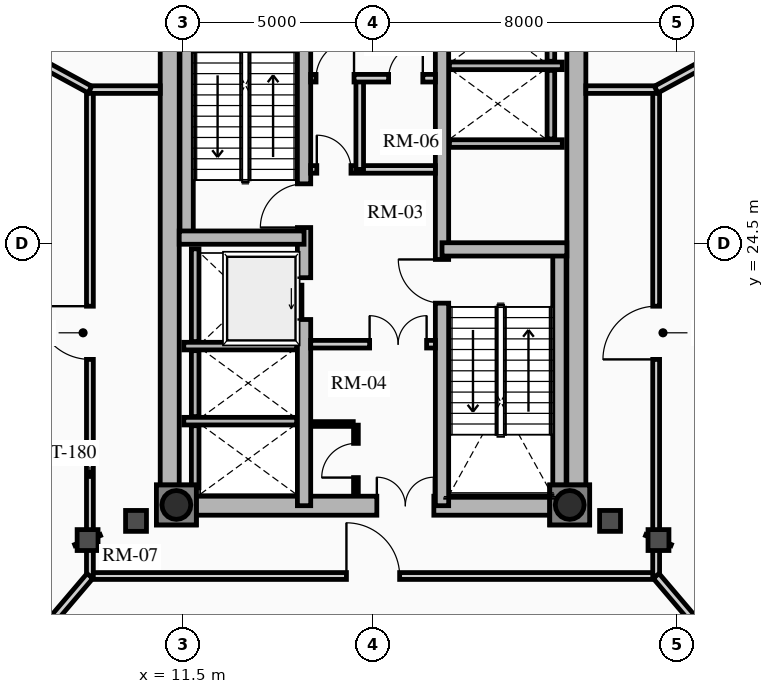
"""IFC4 building model, lengths in metres.
Left out: names, types, materials, properties, quantities, classifications, styles, units other than length and angle.
Written with IfcOpenShell. Run it as: python <this file> out.ifc"""

import sys

from ifc_helpers import new_model, si_unit, direction, frame, frame_2d, origin, origin_2d, place, context, subcontext, project, spatial, rectangle, hollow_circle, extrude, source, transform, mapped, element, fill, save


model = new_model("IFC4")
c1 = context("Model", 3, precision=1e-05, world=origin(), true_north=direction((0.0, 1.0)))
c2 = subcontext(c1, "Body", "Model", "MODEL_VIEW")
j1 = project(units=[si_unit("LENGTHUNIT", "METRE"), si_unit("PLANEANGLEUNIT", "RADIAN")], contexts=[c1])
p1 = place(None, origin())
s1 = spatial("IfcSite", under=j1, at=p1, CompositionType="ELEMENT")
p2 = place(p1, origin())
s2 = spatial("IfcBuilding", under=s1, at=p2, CompositionType="ELEMENT")
p3 = place(p2, frame((0.0, 0.0, 65.65)))
s3 = spatial("IfcBuildingStorey", under=s2, at=p3, CompositionType="ELEMENT", Elevation=65.65)
for number, where, z_axis, x_axis in (
    (1, (11.15, 17.35, 0.0), (0.0, 0.0, 1.0), (0.0, 1.0, 0.0)),
    (2, (21.85, 17.35, 0.0), (0.0, 0.0, 1.0), (0.0, 1.0, 0.0)),
):
    element("IfcWall", number, at=place(p3, frame(where, z_axis=z_axis, x_axis=x_axis)), inside=s3, PredefinedType="SHEAR", context=c2, shape_type="SweptSolid", body=[
        extrude(rectangle(XDim=14.3, YDim=0.5, at=frame_2d((7.15, 0.0))), origin(), (0.0, 0.0, 1.0), 4.5),
    ])
p4 = place(p3, frame((11.15, 17.6, 0.0), z_axis=(0.0, 0.0, 1.0), x_axis=(1.0, 0.0, 0.0)))
e3 = element("IfcWall", 3, at=p4, inside=s3, PredefinedType="SHEAR", context=c2, shape_type="SweptSolid", body=[
    extrude(rectangle(XDim=10.7, YDim=0.5, at=frame_2d((5.35, 0.0))), origin(), (0.0, 0.0, 1.0), 4.5),
])
m1 = source(origin(), c2, "Body", "SweptSolid", [
    extrude(rectangle(XDim=1.5, YDim=2.02, at=frame_2d((0.75, 1.01))), frame((0.0, 0.26, 0.0), z_axis=(0.0, -1.0, 0.0), x_axis=(1.0, 0.0, 0.0)), (0.0, 0.0, 1.0), 0.52),
])
p5 = place(p4, frame((5.45, 0.0, 0.0)))
e4 = element("IfcOpeningElement", 4, at=p5, cuts=e3, PredefinedType="OPENING", context=c2, shape_type="MappedRepresentation", body=[
    mapped(m1, transform((0.0, 0.0, 0.0), x_axis=(1.0, 0.0, 0.0), y_axis=(0.0, 1.0, 0.0), z_axis=(0.0, 0.0, 1.0), scale=1.0)),
])
p6 = place(p3, frame((14.685, 17.6, 0.0), z_axis=(0.0, 0.0, 1.0), x_axis=(0.0, 1.0, 0.0)))
e5 = element("IfcWall", 5, at=p6, inside=s3, PredefinedType="SHEAR", context=c2, shape_type="SweptSolid", body=[
    extrude(rectangle(XDim=13.8, YDim=0.35, at=frame_2d((6.9, 0.0))), origin(), (0.0, 0.0, 1.0), 4.5),
])
m2 = source(origin(), c2, "Body", "SweptSolid", [
    extrude(rectangle(XDim=1.1, YDim=2.015, at=frame_2d((0.55, 1.007))), frame((0.0, 0.185, 0.0), z_axis=(0.0, -1.0, 0.0), x_axis=(1.0, 0.0, 0.0)), (0.0, 0.0, 1.0), 0.37),
])
p7 = place(p6, frame((4.9, 0.0, 0.0)))
e6 = element("IfcOpeningElement", 6, at=p7, cuts=e5, PredefinedType="OPENING", context=c2, shape_type="MappedRepresentation", body=[
    mapped(m2, transform((0.0, 0.0, 0.0), x_axis=(1.0, 0.0, 0.0), y_axis=(0.0, 1.0, 0.0), z_axis=(0.0, 0.0, 1.0), scale=1.0)),
])
m3 = source(origin(), c2, "Body", "SweptSolid", [
    extrude(rectangle(XDim=1.15, YDim=2.02, at=frame_2d((0.575, 1.01))), frame((0.0, 0.185, 0.0), z_axis=(0.0, -1.0, 0.0), x_axis=(1.0, 0.0, 0.0)), (0.0, 0.0, 1.0), 0.37),
])
p8 = place(p6, frame((7.32, 0.0, 0.0)))
e7 = element("IfcOpeningElement", 7, at=p8, cuts=e5, PredefinedType="OPENING", context=c2, shape_type="MappedRepresentation", body=[
    mapped(m3, transform((0.0, 0.0, 0.0), x_axis=(1.0, 0.0, 0.0), y_axis=(0.0, 1.0, 0.0), z_axis=(0.0, 0.0, 1.0), scale=1.0)),
])
p9 = place(p3, frame((18.315, 17.6, 0.0), z_axis=(0.0, 0.0, 1.0), x_axis=(0.0, 1.0, 0.0)))
e8 = element("IfcWall", 8, at=p9, inside=s3, PredefinedType="SHEAR", context=c2, shape_type="SweptSolid", body=[
    extrude(rectangle(XDim=13.8, YDim=0.35, at=frame_2d((6.9, 0.0))), origin(), (0.0, 0.0, 1.0), 4.5),
])
p10 = place(p9, frame((5.33, 0.0, 0.0)))
e9 = element("IfcOpeningElement", 9, at=p10, cuts=e8, PredefinedType="OPENING", context=c2, shape_type="MappedRepresentation", body=[
    mapped(m3, transform((0.0, 0.0, 0.0), x_axis=(1.0, 0.0, 0.0), y_axis=(0.0, 1.0, 0.0), z_axis=(0.0, 0.0, 1.0), scale=1.0)),
])
p11 = place(p3, frame((11.595, 24.655, 0.0), z_axis=(0.0, 0.0, 1.0), x_axis=(0.0, 1.0, 0.0)))
e10 = element("IfcWall", 10, at=p11, inside=s3, PredefinedType="SHEAR", context=c2, shape_type="SweptSolid", body=[
    extrude(rectangle(XDim=6.745, YDim=0.35, at=frame_2d((3.373, 0.0))), origin(), (0.0, 0.0, 1.0), 4.5),
])
p12 = place(p3, frame((11.4, 24.655, 0.0), z_axis=(0.0, 0.0, 1.0), x_axis=(1.0, 0.0, 0.0)))
e11 = element("IfcWall", 11, at=p12, inside=s3, PredefinedType="SHEAR", context=c2, shape_type="SweptSolid", body=[
    extrude(rectangle(XDim=3.285, YDim=0.35, at=frame_2d((1.643, 0.0))), origin(), (0.0, 0.0, 1.0), 4.5),
])
p13 = place(p3, frame((21.405, 17.6, 0.0), z_axis=(0.0, 0.0, 1.0), x_axis=(0.0, 1.0, 0.0)))
e12 = element("IfcWall", 12, at=p13, inside=s3, PredefinedType="SHEAR", context=c2, shape_type="SweptSolid", body=[
    extrude(rectangle(XDim=6.745, YDim=0.35, at=frame_2d((3.373, 0.0))), origin(), (0.0, 0.0, 1.0), 4.5),
])
p14 = place(p3, frame((18.315, 24.345, 0.0), z_axis=(0.0, 0.0, 1.0), x_axis=(1.0, 0.0, 0.0)))
e13 = element("IfcWall", 13, at=p14, inside=s3, PredefinedType="SHEAR", context=c2, shape_type="SweptSolid", body=[
    extrude(rectangle(XDim=3.285, YDim=0.35, at=frame_2d((1.643, 0.0))), origin(), (0.0, 0.0, 1.0), 4.5),
])
for number, where, z_axis, x_axis in (
    (14, (11.325, 17.62, 0.0), (0.0, 0.0, 1.0), (1.0, 0.0, 0.0)),
    (15, (21.675, 17.62, 0.0), (0.0, 0.0, 1.0), (1.0, 0.0, 0.0)),
):
    element("IfcColumn", number, at=place(p3, frame(where, z_axis=z_axis, x_axis=x_axis)), inside=s3, PredefinedType="COLUMN", context=c2, shape_type="SweptSolid", body=[
        extrude(hollow_circle(Radius=0.38, WallThickness=0.032, at=origin_2d()), origin(), (0.0, 0.0, 1.0), 4.5),
    ])
p15 = place(p3, frame((11.52, 21.8, 0.0), z_axis=(0.0, 0.0, 1.0), x_axis=(1.0, 0.0, 0.0)))
e16 = element("IfcWall", 16, at=p15, inside=s3, PredefinedType="SHEAR", context=c2, shape_type="SweptSolid", body=[
    extrude(rectangle(XDim=2.97, YDim=0.2, at=frame_2d((1.485, 0.0))), origin(), (0.0, 0.0, 1.0), 4.5),
])
p16 = place(p3, frame((11.82, 21.92, 0.0), z_axis=(0.0, 0.0, 1.0), x_axis=(0.0, 1.0, 0.0)))
e17 = element("IfcWall", 17, at=p16, inside=s3, PredefinedType="SHEAR", context=c2, shape_type="SweptSolid", body=[
    extrude(rectangle(XDim=2.44, YDim=0.2, at=frame_2d((1.22, 0.0))), origin(), (0.0, 0.0, 1.0), 4.5),
])
p17 = place(p3, frame((11.52, 19.825, 0.0), z_axis=(0.0, 0.0, 1.0), x_axis=(1.0, 0.0, 0.0)))
e18 = element("IfcWall", 18, at=p17, inside=s3, PredefinedType="SHEAR", context=c2, shape_type="SweptSolid", body=[
    extrude(rectangle(XDim=2.97, YDim=0.2, at=frame_2d((1.485, 0.0))), origin(), (0.0, 0.0, 1.0), 4.5),
])
p18 = place(p3, frame((11.82, 19.945, 0.0), z_axis=(0.0, 0.0, 1.0), x_axis=(0.0, 1.0, 0.0)))
e19 = element("IfcWall", 19, at=p18, inside=s3, PredefinedType="SHEAR", context=c2, shape_type="SweptSolid", body=[
    extrude(rectangle(XDim=1.735, YDim=0.2, at=frame_2d((0.867, 0.0))), origin(), (0.0, 0.0, 1.0), 4.5),
])
p19 = place(p3, frame((11.82, 18.07, 0.0), z_axis=(0.0, 0.0, 1.0), x_axis=(0.0, 1.0, 0.0)))
e20 = element("IfcWall", 20, at=p19, inside=s3, PredefinedType="SHEAR", context=c2, shape_type="SweptSolid", body=[
    extrude(rectangle(XDim=1.635, YDim=0.2, at=frame_2d((0.817, 0.0))), origin(), (0.0, 0.0, 1.0), 4.5),
])
for number, where, z_axis, x_axis in (
    (21, (18.51, 27.13, 0.0), (0.0, 0.0, 1.0), (1.0, 0.0, 0.0)),
    (22, (18.51, 29.175, 0.0), (0.0, 0.0, 1.0), (1.0, 0.0, 0.0)),
):
    element("IfcWall", number, at=place(p3, frame(where, z_axis=z_axis, x_axis=x_axis)), inside=s3, PredefinedType="SHEAR", context=c2, shape_type="SweptSolid", body=[
        extrude(rectangle(XDim=2.97, YDim=0.2, at=frame_2d((1.485, 0.0))), origin(), (0.0, 0.0, 1.0), 4.5),
    ])
p20 = place(p3, frame((21.18, 27.25, 0.0), z_axis=(0.0, 0.0, 1.0), x_axis=(0.0, 1.0, 0.0)))
e23 = element("IfcWall", 23, at=p20, inside=s3, PredefinedType="SHEAR", context=c2, shape_type="SweptSolid", body=[
    extrude(rectangle(XDim=1.805, YDim=0.2, at=frame_2d((0.902, 0.0))), origin(), (0.0, 0.0, 1.0), 4.5),
])
p21 = place(p3, frame((21.18, 29.295, 0.0), z_axis=(0.0, 0.0, 1.0), x_axis=(0.0, 1.0, 0.0)))
e24 = element("IfcWall", 24, at=p21, inside=s3, PredefinedType="SHEAR", context=c2, shape_type="SweptSolid", body=[
    extrude(rectangle(XDim=1.635, YDim=0.2, at=frame_2d((0.817, 0.0))), origin(), (0.0, 0.0, 1.0), 4.5),
])
p22 = place(p3, frame((14.86, 21.85, 0.0), z_axis=(0.0, 0.0, 1.0), x_axis=(1.0, 0.0, 0.0)))
e25 = element("IfcWall", 25, at=p22, inside=s3, PredefinedType="PARTITIONING", context=c2, shape_type="SweptSolid", body=[
    extrude(rectangle(XDim=3.28, YDim=0.2, at=frame_2d((1.64, 0.0))), origin(), (0.0, 0.0, 1.0), 4.245),
])
m4 = source(origin(), c2, "Body", "SweptSolid", [
    extrude(rectangle(XDim=1.5, YDim=2.02, at=frame_2d((0.75, 1.01))), frame((0.0, 0.11, 0.0), z_axis=(0.0, -1.0, 0.0), x_axis=(1.0, 0.0, 0.0)), (0.0, 0.0, 1.0), 0.22),
])
p23 = place(p22, frame((1.55, 0.0, 0.0)))
e26 = element("IfcOpeningElement", 26, at=p23, cuts=e25, PredefinedType="OPENING", context=c2, shape_type="MappedRepresentation", body=[
    mapped(m4, transform((0.0, 0.0, 0.0), x_axis=(1.0, 0.0, 0.0), y_axis=(0.0, 1.0, 0.0), z_axis=(0.0, 0.0, 1.0), scale=1.0)),
])
p24 = place(p3, frame((14.86, 26.45, 0.0), z_axis=(0.0, 0.0, 1.0), x_axis=(1.0, 0.0, 0.0)))
e27 = element("IfcWall", 27, at=p24, inside=s3, PredefinedType="PARTITIONING", context=c2, shape_type="SweptSolid", body=[
    extrude(rectangle(XDim=3.28, YDim=0.2, at=frame_2d((1.64, 0.0))), origin(), (0.0, 0.0, 1.0), 4.245),
])
m5 = source(origin(), c2, "Body", "SweptSolid", [
    extrude(rectangle(XDim=0.9, YDim=2.005, at=frame_2d((0.45, 1.002))), frame((0.0, 0.11, 0.0), z_axis=(0.0, -1.0, 0.0), x_axis=(1.0, 0.0, 0.0)), (0.0, 0.0, 1.0), 0.22),
])
p25 = place(p24, frame((0.16, 0.0, 0.0)))
e28 = element("IfcOpeningElement", 28, at=p25, cuts=e27, PredefinedType="OPENING", context=c2, shape_type="MappedRepresentation", body=[
    mapped(m5, transform((0.0, 0.0, 0.0), x_axis=(1.0, 0.0, 0.0), y_axis=(0.0, 1.0, 0.0), z_axis=(0.0, 0.0, 1.0), scale=1.0)),
])
p26 = place(p3, frame((16.15, 26.45, 0.0), z_axis=(0.0, 0.0, 1.0), x_axis=(0.0, 1.0, 0.0)))
e29 = element("IfcWall", 29, at=p26, inside=s3, PredefinedType="PARTITIONING", context=c2, shape_type="SweptSolid", body=[
    extrude(rectangle(XDim=2.4, YDim=0.2, at=frame_2d((1.2, 0.0))), origin(), (0.0, 0.0, 1.0), 4.245),
])
p27 = place(p3, frame((14.86, 28.85, 0.0), z_axis=(0.0, 0.0, 1.0), x_axis=(1.0, 0.0, 0.0)))
e30 = element("IfcWall", 30, at=p27, inside=s3, PredefinedType="PARTITIONING", context=c2, shape_type="SweptSolid", body=[
    extrude(rectangle(XDim=3.28, YDim=0.2, at=frame_2d((1.64, 0.0))), origin(), (0.0, 0.0, 1.0), 4.245),
])
m6 = source(origin(), c2, "Body", "SweptSolid", [
    extrude(rectangle(XDim=1.0, YDim=2.015, at=frame_2d((0.5, 1.007))), frame((0.0, 0.11, 0.0), z_axis=(0.0, -1.0, 0.0), x_axis=(1.0, 0.0, 0.0)), (0.0, 0.0, 1.0), 0.22),
])
p28 = place(p27, frame((0.14, 0.0, 0.0)))
e31 = element("IfcOpeningElement", 31, at=p28, cuts=e30, PredefinedType="OPENING", context=c2, shape_type="MappedRepresentation", body=[
    mapped(m6, transform((0.0, 0.0, 0.0), x_axis=(1.0, 0.0, 0.0), y_axis=(0.0, 1.0, 0.0), z_axis=(0.0, 0.0, 1.0), scale=1.0)),
])
p29 = place(p27, frame((2.05, 0.0, 0.0)))
e32 = element("IfcOpeningElement", 32, at=p29, cuts=e30, PredefinedType="OPENING", context=c2, shape_type="MappedRepresentation", body=[
    mapped(m5, transform((0.0, 0.0, 0.0), x_axis=(1.0, 0.0, 0.0), y_axis=(0.0, 1.0, 0.0), z_axis=(0.0, 0.0, 1.0), scale=1.0)),
])
p30 = place(p3, frame((16.05, 17.92, 0.0), z_axis=(0.0, 0.0, 1.0), x_axis=(0.0, 1.0, 0.0)))
e33 = element("IfcWall", 33, at=p30, inside=s3, PredefinedType="PARTITIONING", context=c2, shape_type="SweptSolid", body=[
    extrude(rectangle(XDim=1.8, YDim=0.125, at=frame_2d((0.9, 0.0))), origin(), (0.0, 0.0, 1.0), 4.245),
])
m7 = source(origin(), c2, "Body", "SweptSolid", [
    extrude(rectangle(XDim=0.9, YDim=2.005, at=frame_2d((0.45, 1.002))), frame((0.0, 0.073, 0.0), z_axis=(0.0, -1.0, 0.0), x_axis=(1.0, 0.0, 0.0)), (0.0, 0.0, 1.0), 0.145),
])
p31 = place(p30, frame((0.42, 0.0, 0.0)))
e34 = element("IfcOpeningElement", 34, at=p31, cuts=e33, PredefinedType="OPENING", context=c2, shape_type="MappedRepresentation", body=[
    mapped(m7, transform((0.0, 0.0, 0.0), x_axis=(1.0, 0.0, 0.0), y_axis=(0.0, 1.0, 0.0), z_axis=(0.0, 0.0, 1.0), scale=1.0)),
])
p32 = place(p3, frame((14.88, 19.75, 0.0), z_axis=(0.0, 0.0, 1.0), x_axis=(1.0, 0.0, 0.0)))
e35 = element("IfcWall", 35, at=p32, inside=s3, PredefinedType="PARTITIONING", context=c2, shape_type="SweptSolid", body=[
    extrude(rectangle(XDim=1.1, YDim=0.125, at=frame_2d((0.55, 0.0))), origin(), (0.0, 0.0, 1.0), 4.245),
])
p33 = place(p3, frame((9.05, 15.75, 0.0), z_axis=(0.0, 0.0, 1.0), x_axis=(1.0, 0.0, 0.0)))
e36 = element("IfcWall", 36, at=p33, inside=s3, PredefinedType="PARTITIONING", context=c2, shape_type="SweptSolid", body=[
    extrude(rectangle(XDim=14.9, YDim=0.18, at=frame_2d((7.45, 0.0))), origin(), (0.0, 0.0, 1.0), 3.536),
])
m8 = source(origin(), c2, "Body", "SweptSolid", [
    extrude(rectangle(XDim=1.4, YDim=2.02, at=frame_2d((0.7, 1.01))), frame((0.0, 0.1, 0.0), z_axis=(0.0, -1.0, 0.0), x_axis=(1.0, 0.0, 0.0)), (0.0, 0.0, 1.0), 0.2),
])
p34 = place(p33, frame((6.75, 0.0, 0.0)))
e37 = element("IfcOpeningElement", 37, at=p34, cuts=e36, PredefinedType="OPENING", context=c2, shape_type="MappedRepresentation", body=[
    mapped(m8, transform((0.0, 0.0, 0.0), x_axis=(1.0, 0.0, 0.0), y_axis=(0.0, 1.0, 0.0), z_axis=(0.0, 0.0, 1.0), scale=1.0)),
])
p35 = place(p3, frame((9.05, 15.75, 0.0), z_axis=(0.0, 0.0, 1.0), x_axis=(0.0, 1.0, 0.0)))
e38 = element("IfcWall", 38, at=p35, inside=s3, PredefinedType="PARTITIONING", context=c2, shape_type="SweptSolid", body=[
    extrude(rectangle(XDim=12.8, YDim=0.18, at=frame_2d((6.4, 0.0))), origin(), (0.0, 0.0, 1.0), 3.536),
])
p36 = place(p35, frame((5.7, 0.0, 0.0)))
e39 = element("IfcOpeningElement", 39, at=p36, cuts=e38, PredefinedType="OPENING", context=c2, shape_type="MappedRepresentation", body=[
    mapped(m8, transform((0.0, 0.0, 0.0), x_axis=(1.0, 0.0, 0.0), y_axis=(0.0, 1.0, 0.0), z_axis=(0.0, 0.0, 1.0), scale=1.0)),
])
p37 = place(p3, frame((23.95, 15.75, 0.0), z_axis=(0.0, 0.0, 1.0), x_axis=(0.0, 1.0, 0.0)))
e40 = element("IfcWall", 40, at=p37, inside=s3, PredefinedType="PARTITIONING", context=c2, shape_type="SweptSolid", body=[
    extrude(rectangle(XDim=12.8, YDim=0.18, at=frame_2d((6.4, 0.0))), origin(), (0.0, 0.0, 1.0), 3.536),
])
p38 = place(p37, frame((5.7, 0.0, 0.0)))
e41 = element("IfcOpeningElement", 41, at=p38, cuts=e40, PredefinedType="OPENING", context=c2, shape_type="MappedRepresentation", body=[
    mapped(m8, transform((0.0, 0.0, 0.0), x_axis=(1.0, 0.0, 0.0), y_axis=(0.0, 1.0, 0.0), z_axis=(0.0, 0.0, 1.0), scale=1.0)),
])
for number, where, z_axis, x_axis in (
    (42, (9.05, 28.55, 0.0), (0.0, 0.0, 1.0), (1.0, 0.0, 0.0)),
    (43, (22.1, 28.55, 0.0), (0.0, 0.0, 1.0), (1.0, 0.0, 0.0)),
):
    element("IfcWall", number, at=place(p3, frame(where, z_axis=z_axis, x_axis=x_axis)), inside=s3, PredefinedType="PARTITIONING", context=c2, shape_type="SweptSolid", body=[
        extrude(rectangle(XDim=1.85, YDim=0.2, at=frame_2d((0.925, 0.0))), origin(), (0.0, 0.0, 1.0), 4.245),
    ])
p39 = place(p3, frame((9.05, 28.55, 0.0), z_axis=(0.0, 0.0, 1.0), x_axis=(-0.878573622909, 0.477606939992, 0.0)))
e44 = element("IfcWall", 44, at=p39, inside=s3, PredefinedType="PARTITIONING", context=c2, shape_type="SweptSolid", body=[
    extrude(rectangle(XDim=7.352, YDim=0.2, at=frame_2d((3.676, 0.0))), origin(), (0.0, 0.0, 1.0), 3.616),
])
p40 = place(p3, frame((23.95, 28.55, 0.0), z_axis=(0.0, 0.0, 1.0), x_axis=(0.878573622909, 0.477606939992, 0.0)))
e45 = element("IfcWall", 45, at=p40, inside=s3, PredefinedType="PARTITIONING", context=c2, shape_type="SweptSolid", body=[
    extrude(rectangle(XDim=7.352, YDim=0.2, at=frame_2d((3.676, 0.0))), origin(), (0.0, 0.0, 1.0), 3.536),
])
for number, where, z_axis, x_axis in (
    (46, (23.95, 15.75, 0.0), (0.0, 0.0, 1.0), (0.648, -0.761, 0.0)),
    (47, (9.05, 15.75, 0.0), (0.0, 0.0, 1.0), (-0.648, -0.761, 0.0)),
):
    element("IfcWall", number, at=place(p3, frame(where, z_axis=z_axis, x_axis=x_axis)), inside=s3, PredefinedType="PARTITIONING", context=c2, shape_type="SweptSolid", body=[
        extrude(rectangle(XDim=5.439, YDim=0.2, at=frame_2d((2.72, 0.0))), origin(), (0.0, 0.0, 1.0), 3.616),
    ])
m9 = source(origin(), c2, "Body", "SweptSolid", [
    extrude(rectangle(XDim=1.1, YDim=2.015, at=frame_2d((0.55, 1.007))), frame((0.0, 0.025, 0.0), z_axis=(0.0, -1.0, 0.0), x_axis=(1.0, 0.0, 0.0)), (0.0, 0.0, 1.0), 0.05),
])
p41 = place(p7, origin())
e48 = element("IfcDoor", 48, at=p41, inside=s3, OperationType="SLIDING_TO_LEFT", PredefinedType="DOOR", context=c2, shape_type="MappedRepresentation", body=[
    mapped(m9, transform((0.0, 0.0, 0.0), x_axis=(1.0, 0.0, 0.0), y_axis=(0.0, 1.0, 0.0), z_axis=(0.0, 0.0, 1.0), scale=1.0)),
])
fill(e6, e48)
m10 = source(origin(), c2, "Body", "SweptSolid", [
    extrude(rectangle(XDim=1.15, YDim=2.02, at=frame_2d((0.575, 1.01))), frame((0.0, 0.025, 0.0), z_axis=(0.0, -1.0, 0.0), x_axis=(1.0, 0.0, 0.0)), (0.0, 0.0, 1.0), 0.05),
])
p42 = place(p8, origin())
e49 = element("IfcDoor", 49, at=p42, inside=s3, OperationType="SINGLE_SWING_LEFT", PredefinedType="DOOR", context=c2, shape_type="MappedRepresentation", body=[
    mapped(m10, transform((0.0, 0.0, 0.0), x_axis=(1.0, 0.0, 0.0), y_axis=(0.0, 1.0, 0.0), z_axis=(0.0, 0.0, 1.0), scale=1.0)),
])
fill(e7, e49)
p43 = place(p10, origin())
e50 = element("IfcDoor", 50, at=p43, inside=s3, OperationType="SINGLE_SWING_RIGHT", PredefinedType="DOOR", context=c2, shape_type="MappedRepresentation", body=[
    mapped(m10, transform((0.0, 0.0, 0.0), x_axis=(1.0, 0.0, 0.0), y_axis=(0.0, 1.0, 0.0), z_axis=(0.0, 0.0, 1.0), scale=1.0)),
])
fill(e9, e50)
m11 = source(origin(), c2, "Body", "SweptSolid", [
    extrude(rectangle(XDim=1.5, YDim=2.02, at=frame_2d((0.75, 1.01))), frame((0.0, 0.025, 0.0), z_axis=(0.0, -1.0, 0.0), x_axis=(1.0, 0.0, 0.0)), (0.0, 0.0, 1.0), 0.05),
])
p44 = place(p5, origin())
e51 = element("IfcDoor", 51, at=p44, inside=s3, OperationType="DOUBLE_DOOR_SINGLE_SWING", PredefinedType="DOOR", context=c2, shape_type="MappedRepresentation", body=[
    mapped(m11, transform((0.0, 0.0, 0.0), x_axis=(1.0, 0.0, 0.0), y_axis=(0.0, 1.0, 0.0), z_axis=(0.0, 0.0, 1.0), scale=1.0)),
])
fill(e4, e51)
p45 = place(p23, origin())
e52 = element("IfcDoor", 52, at=p45, inside=s3, OperationType="DOUBLE_DOOR_SINGLE_SWING", PredefinedType="DOOR", context=c2, shape_type="MappedRepresentation", body=[
    mapped(m11, transform((0.0, 0.0, 0.0), x_axis=(1.0, 0.0, 0.0), y_axis=(0.0, 1.0, 0.0), z_axis=(0.0, 0.0, 1.0), scale=1.0)),
])
fill(e26, e52)
m12 = source(origin(), c2, "Body", "SweptSolid", [
    extrude(rectangle(XDim=0.9, YDim=2.005, at=frame_2d((0.45, 1.002))), frame((0.0, 0.025, 0.0), z_axis=(0.0, -1.0, 0.0), x_axis=(1.0, 0.0, 0.0)), (0.0, 0.0, 1.0), 0.05),
])
p46 = place(p25, origin())
e53 = element("IfcDoor", 53, at=p46, inside=s3, OperationType="SINGLE_SWING_LEFT", PredefinedType="DOOR", context=c2, shape_type="MappedRepresentation", body=[
    mapped(m12, transform((0.0, 0.0, 0.0), x_axis=(1.0, 0.0, 0.0), y_axis=(0.0, 1.0, 0.0), z_axis=(0.0, 0.0, 1.0), scale=1.0)),
])
fill(e28, e53)
m13 = source(origin(), c2, "Body", "SweptSolid", [
    extrude(rectangle(XDim=1.0, YDim=2.015, at=frame_2d((0.5, 1.007))), frame((0.0, 0.025, 0.0), z_axis=(0.0, -1.0, 0.0), x_axis=(1.0, 0.0, 0.0)), (0.0, 0.0, 1.0), 0.05),
])
p47 = place(p28, origin())
e54 = element("IfcDoor", 54, at=p47, inside=s3, OperationType="SINGLE_SWING_RIGHT", PredefinedType="DOOR", context=c2, shape_type="MappedRepresentation", body=[
    mapped(m13, transform((0.0, 0.0, 0.0), x_axis=(1.0, 0.0, 0.0), y_axis=(0.0, 1.0, 0.0), z_axis=(0.0, 0.0, 1.0), scale=1.0)),
])
fill(e31, e54)
p48 = place(p31, origin())
e55 = element("IfcDoor", 55, at=p48, inside=s3, OperationType="SINGLE_SWING_LEFT", PredefinedType="DOOR", context=c2, shape_type="MappedRepresentation", body=[
    mapped(m12, transform((0.0, 0.0, 0.0), x_axis=(1.0, 0.0, 0.0), y_axis=(0.0, 1.0, 0.0), z_axis=(0.0, 0.0, 1.0), scale=1.0)),
])
fill(e34, e55)
p49 = place(p29, origin())
e56 = element("IfcDoor", 56, at=p49, inside=s3, OperationType="SINGLE_SWING_RIGHT", PredefinedType="DOOR", context=c2, shape_type="MappedRepresentation", body=[
    mapped(m12, transform((0.0, 0.0, 0.0), x_axis=(1.0, 0.0, 0.0), y_axis=(0.0, 1.0, 0.0), z_axis=(0.0, 0.0, 1.0), scale=1.0)),
])
fill(e32, e56)
m14 = source(origin(), c2, "Body", "SweptSolid", [
    extrude(rectangle(XDim=1.4, YDim=2.02, at=frame_2d((0.7, 1.01))), frame((0.0, 0.025, 0.0), z_axis=(0.0, -1.0, 0.0), x_axis=(1.0, 0.0, 0.0)), (0.0, 0.0, 1.0), 0.05),
])
p50 = place(p34, origin())
e57 = element("IfcDoor", 57, at=p50, inside=s3, OperationType="SINGLE_SWING_LEFT", PredefinedType="DOOR", context=c2, shape_type="MappedRepresentation", body=[
    mapped(m14, transform((0.0, 0.0, 0.0), x_axis=(1.0, 0.0, 0.0), y_axis=(0.0, 1.0, 0.0), z_axis=(0.0, 0.0, 1.0), scale=1.0)),
])
fill(e37, e57)
p51 = place(p36, origin())
e58 = element("IfcDoor", 58, at=p51, inside=s3, OperationType="SINGLE_SWING_RIGHT", PredefinedType="DOOR", context=c2, shape_type="MappedRepresentation", body=[
    mapped(m14, transform((0.0, 0.0, 0.0), x_axis=(1.0, 0.0, 0.0), y_axis=(0.0, 1.0, 0.0), z_axis=(0.0, 0.0, 1.0), scale=1.0)),
])
fill(e39, e58)
p52 = place(p38, origin())
e59 = element("IfcDoor", 59, at=p52, inside=s3, OperationType="SINGLE_SWING_LEFT", PredefinedType="DOOR", context=c2, shape_type="MappedRepresentation", body=[
    mapped(m14, transform((0.0, 0.0, 0.0), x_axis=(1.0, 0.0, 0.0), y_axis=(0.0, 1.0, 0.0), z_axis=(0.0, 0.0, 1.0), scale=1.0)),
])
fill(e41, e59)
save(model, sys.argv[1])
